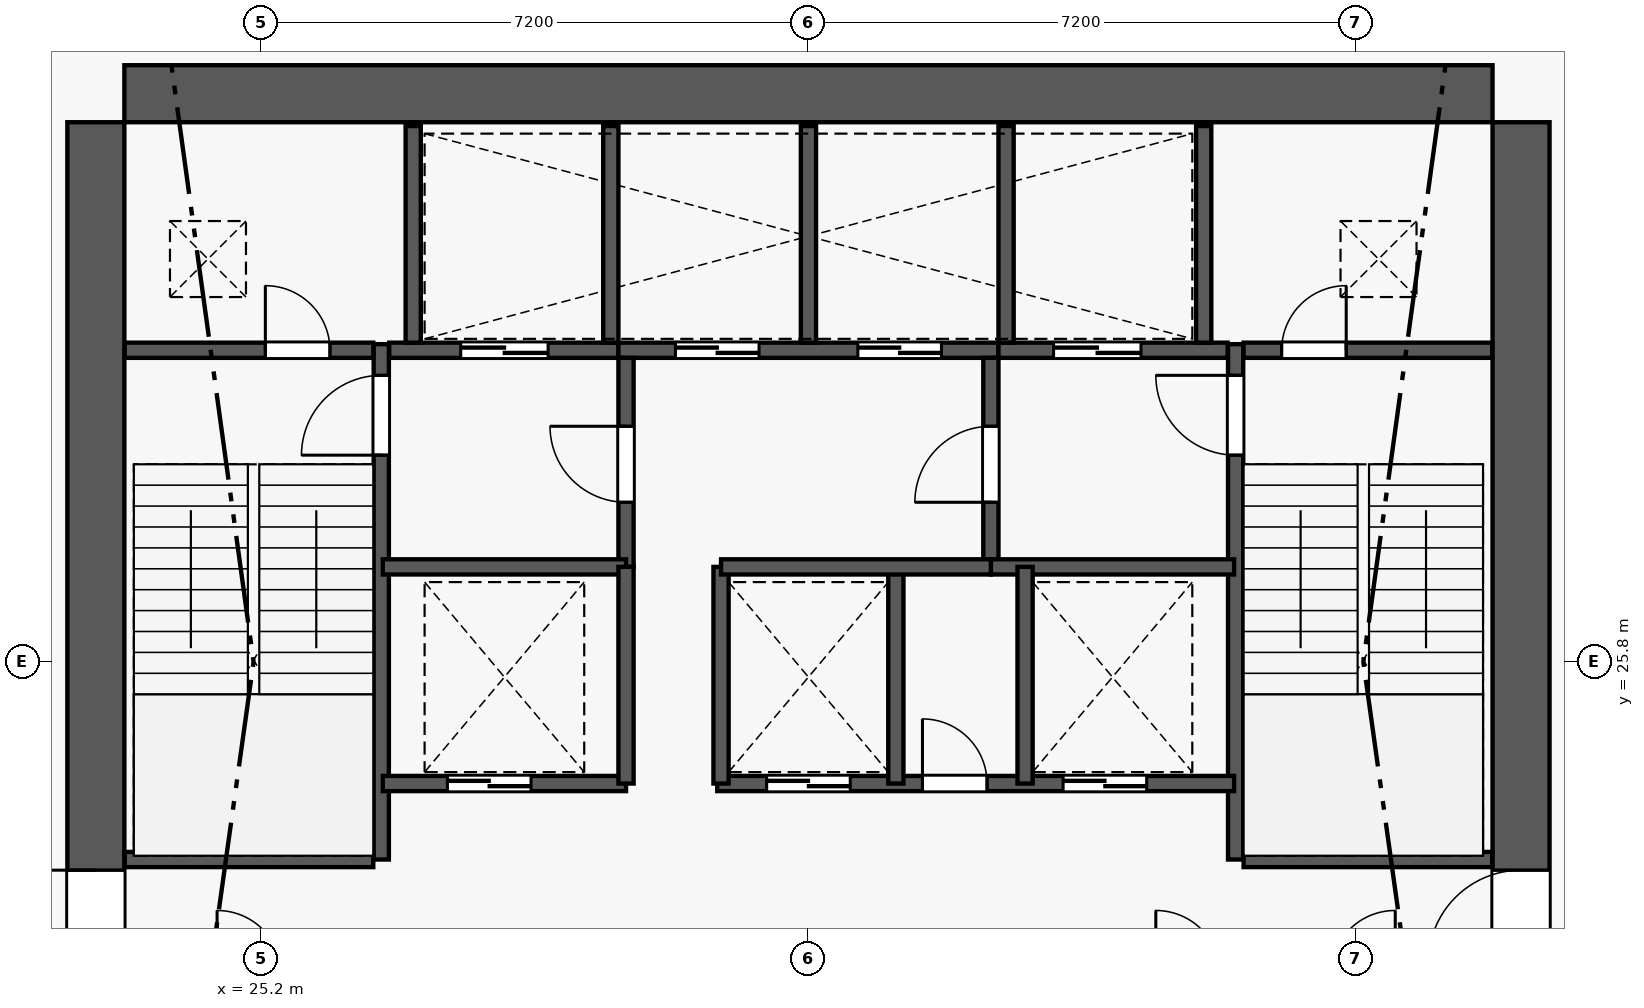
"""IFC4 building model, lengths in metres.
Left out: names, types, materials, properties, quantities, classifications, styles, units other than length and angle.
Written with IfcOpenShell. Run it as: python <this file> out.ifc"""

import sys

from ifc_helpers import new_model, si_unit, direction, frame, frame_2d, origin, origin_2d, place, context, subcontext, project, spatial, rectangle, extrude, element, fill, save


model = new_model("IFC4")
c1 = context("Model", 3, precision=1e-05, world=origin(), true_north=direction((0.0, 1.0)))
c2 = subcontext(c1, "Body", "Model", "MODEL_VIEW")
j1 = project(units=[si_unit("LENGTHUNIT", "METRE"), si_unit("PLANEANGLEUNIT", "RADIAN")], contexts=[c1])
p1 = place(None, origin())
s1 = spatial("IfcSite", under=j1, at=p1, CompositionType="ELEMENT")
p2 = place(p1, origin())
s2 = spatial("IfcBuilding", under=s1, at=p2, CompositionType="ELEMENT")
p3 = place(p2, frame((0.0, 0.0, 94.2)))
s3 = spatial("IfcBuildingStorey", under=s2, at=p3, CompositionType="ELEMENT", Elevation=94.2)
for number, where, z_axis, x_axis in (
    (1, (41.775, 33.275, 0.0), (0.0, 0.0, 1.0), (1.0, 0.0, 0.0)),
    (2, (23.025, 33.275, 0.0), (0.0, 0.0, 1.0), (1.0, 0.0, 0.0)),
):
    element("IfcColumn", number, at=place(p3, frame(where, z_axis=z_axis, x_axis=x_axis)), inside=s3, PredefinedType="COLUMN", context=c2, shape_type="SweptSolid", body=[
        extrude(rectangle(XDim=0.75, YDim=0.75, at=origin_2d()), origin(), (0.0, 0.0, 1.0), 4.2),
    ])
p4 = place(p3, frame((23.4, 33.275, 0.0), z_axis=(0.0, 0.0, 1.0), x_axis=(1.0, 0.0, 0.0)))
e3 = element("IfcWall", 3, at=p4, inside=s3, PredefinedType="SHEAR", context=c2, shape_type="SweptSolid", body=[
    extrude(rectangle(XDim=18.0, YDim=0.75, at=frame_2d((9.0, 0.0))), origin(), (0.0, 0.0, 1.0), 3.99),
])
p5 = place(p3, frame((23.025, 18.9, 0.0), z_axis=(0.0, 0.0, 1.0), x_axis=(0.0, 1.0, 0.0)))
e4 = element("IfcWall", 4, at=p5, inside=s3, PredefinedType="SHEAR", context=c2, shape_type="SweptSolid", body=[
    extrude(rectangle(XDim=14.0, YDim=0.75, at=frame_2d((7.0, 0.0))), origin(), (0.0, 0.0, 1.0), 3.99),
])
p6 = place(p5, frame((2.94, 0.0, 0.0)))
e5 = element("IfcOpeningElement", 5, at=p6, cuts=e4, PredefinedType="OPENING", context=c2, shape_type="SweptSolid", body=[
    extrude(rectangle(XDim=1.22, YDim=2.25, at=frame_2d((0.61, 1.125))), frame((0.0, 0.385, 0.0), z_axis=(0.0, -1.0, 0.0), x_axis=(1.0, 0.0, 0.0)), (0.0, 0.0, 1.0), 0.77),
])
p7 = place(p3, frame((41.775, 18.9, 0.0), z_axis=(0.0, 0.0, 1.0), x_axis=(0.0, 1.0, 0.0)))
e6 = element("IfcWall", 6, at=p7, inside=s3, PredefinedType="SHEAR", context=c2, shape_type="SweptSolid", body=[
    extrude(rectangle(XDim=14.0, YDim=0.75, at=frame_2d((7.0, 0.0))), origin(), (0.0, 0.0, 1.0), 3.99),
])
p8 = place(p7, frame((2.94, 0.0, 0.0)))
e7 = element("IfcOpeningElement", 7, at=p8, cuts=e6, PredefinedType="OPENING", context=c2, shape_type="SweptSolid", body=[
    extrude(rectangle(XDim=1.22, YDim=2.25, at=frame_2d((0.61, 1.125))), frame((0.0, 0.385, 0.0), z_axis=(0.0, -1.0, 0.0), x_axis=(1.0, 0.0, 0.0)), (0.0, 0.0, 1.0), 0.77),
])
p9 = place(p3, frame((26.78, 23.2, 0.0), z_axis=(0.0, 0.0, 1.0), x_axis=(0.0, 1.0, 0.0)))
e8 = element("IfcWall", 8, at=p9, inside=s3, PredefinedType="SHEAR", context=c2, shape_type="SweptSolid", body=[
    extrude(rectangle(XDim=6.78, YDim=0.2, at=frame_2d((3.39, 0.0))), origin(), (0.0, 0.0, 1.0), 4.2),
])
p10 = place(p9, frame((5.32, 0.0, 0.0)))
e9 = element("IfcOpeningElement", 9, at=p10, cuts=e8, PredefinedType="OPENING", context=c2, shape_type="SweptSolid", body=[
    extrude(rectangle(XDim=1.05, YDim=2.15, at=frame_2d((0.525, 1.075))), frame((0.0, 0.11, 0.0), z_axis=(0.0, -1.0, 0.0), x_axis=(1.0, 0.0, 0.0)), (0.0, 0.0, 1.0), 0.22),
])
p11 = place(p3, frame((23.405, 23.2, 0.0), z_axis=(0.0, 0.0, 1.0), x_axis=(1.0, 0.0, 0.0)))
e10 = element("IfcWall", 10, at=p11, inside=s3, PredefinedType="PLUMBINGWALL", context=c2, shape_type="SweptSolid", body=[
    extrude(rectangle(XDim=3.27, YDim=0.2, at=frame_2d((1.635, 0.0))), origin(), (0.0, 0.0, 1.0), 3.99),
])
p12 = place(p3, frame((38.02, 23.2, 0.0), z_axis=(0.0, 0.0, 1.0), x_axis=(0.0, 1.0, 0.0)))
e11 = element("IfcWall", 11, at=p12, inside=s3, PredefinedType="SHEAR", context=c2, shape_type="SweptSolid", body=[
    extrude(rectangle(XDim=6.78, YDim=0.2, at=frame_2d((3.39, 0.0))), origin(), (0.0, 0.0, 1.0), 4.2),
])
p13 = place(p12, frame((5.32, 0.0, 0.0)))
e12 = element("IfcOpeningElement", 12, at=p13, cuts=e11, PredefinedType="OPENING", context=c2, shape_type="SweptSolid", body=[
    extrude(rectangle(XDim=1.05, YDim=2.15, at=frame_2d((0.525, 1.075))), frame((0.0, 0.11, 0.0), z_axis=(0.0, -1.0, 0.0), x_axis=(1.0, 0.0, 0.0)), (0.0, 0.0, 1.0), 0.22),
])
p14 = place(p3, frame((38.125, 23.2, 0.0), z_axis=(0.0, 0.0, 1.0), x_axis=(1.0, 0.0, 0.0)))
e13 = element("IfcWall", 13, at=p14, inside=s3, PredefinedType="PLUMBINGWALL", context=c2, shape_type="SweptSolid", body=[
    extrude(rectangle(XDim=3.27, YDim=0.2, at=frame_2d((1.635, 0.0))), origin(), (0.0, 0.0, 1.0), 3.99),
])
p15 = place(p3, frame((23.405, 29.9, 0.0), z_axis=(0.0, 0.0, 1.0), x_axis=(1.0, 0.0, 0.0)))
e14 = element("IfcWall", 14, at=p15, inside=s3, PredefinedType="PLUMBINGWALL", context=c2, shape_type="SweptSolid", body=[
    extrude(rectangle(XDim=3.27, YDim=0.2, at=frame_2d((1.635, 0.0))), origin(), (0.0, 0.0, 1.0), 3.99),
])
p16 = place(p15, frame((1.85, 0.0, 0.0)))
e15 = element("IfcOpeningElement", 15, at=p16, cuts=e14, PredefinedType="OPENING", context=c2, shape_type="SweptSolid", body=[
    extrude(rectangle(XDim=0.85, YDim=2.05, at=frame_2d((0.425, 1.025))), frame((0.0, 0.11, 0.0), z_axis=(0.0, -1.0, 0.0), x_axis=(1.0, 0.0, 0.0)), (0.0, 0.0, 1.0), 0.22),
])
p17 = place(p3, frame((26.885, 29.9, 0.0), z_axis=(0.0, 0.0, 1.0), x_axis=(1.0, 0.0, 0.0)))
e16 = element("IfcWall", 16, at=p17, inside=s3, PredefinedType="PLUMBINGWALL", context=c2, shape_type="SweptSolid", body=[
    extrude(rectangle(XDim=3.015, YDim=0.2, at=frame_2d((1.507, 0.0))), origin(), (0.0, 0.0, 1.0), 3.99),
])
p18 = place(p17, frame((0.94, 0.0, 0.0)))
e17 = element("IfcOpeningElement", 17, at=p18, cuts=e16, PredefinedType="OPENING", context=c2, shape_type="SweptSolid", body=[
    extrude(rectangle(XDim=1.15, YDim=2.2, at=frame_2d((0.575, 1.1))), frame((0.0, 0.11, 0.0), z_axis=(0.0, -1.0, 0.0), x_axis=(1.0, 0.0, 0.0)), (0.0, 0.0, 1.0), 0.22),
])
p19 = place(p3, frame((29.9, 29.9, 0.0), z_axis=(0.0, 0.0, 1.0), x_axis=(1.0, 0.0, 0.0)))
e18 = element("IfcWall", 18, at=p19, inside=s3, PredefinedType="PLUMBINGWALL", context=c2, shape_type="SweptSolid", body=[
    extrude(rectangle(XDim=5.0, YDim=0.2, at=frame_2d((2.5, 0.0))), origin(), (0.0, 0.0, 1.0), 3.99),
])
p20 = place(p19, frame((0.75, 0.0, 0.0)))
e19 = element("IfcOpeningElement", 19, at=p20, cuts=e18, PredefinedType="OPENING", context=c2, shape_type="SweptSolid", body=[
    extrude(rectangle(XDim=1.1, YDim=2.2, at=frame_2d((0.55, 1.1))), frame((0.0, 0.11, 0.0), z_axis=(0.0, -1.0, 0.0), x_axis=(1.0, 0.0, 0.0)), (0.0, 0.0, 1.0), 0.22),
])
p21 = place(p19, frame((3.15, 0.0, 0.0)))
e20 = element("IfcOpeningElement", 20, at=p21, cuts=e18, PredefinedType="OPENING", context=c2, shape_type="SweptSolid", body=[
    extrude(rectangle(XDim=1.1, YDim=2.2, at=frame_2d((0.55, 1.1))), frame((0.0, 0.11, 0.0), z_axis=(0.0, -1.0, 0.0), x_axis=(1.0, 0.0, 0.0)), (0.0, 0.0, 1.0), 0.22),
])
p22 = place(p3, frame((34.9, 29.9, 0.0), z_axis=(0.0, 0.0, 1.0), x_axis=(1.0, 0.0, 0.0)))
e21 = element("IfcWall", 21, at=p22, inside=s3, PredefinedType="PLUMBINGWALL", context=c2, shape_type="SweptSolid", body=[
    extrude(rectangle(XDim=3.015, YDim=0.2, at=frame_2d((1.508, 0.0))), origin(), (0.0, 0.0, 1.0), 3.99),
])
p23 = place(p22, frame((0.725, 0.0, 0.0)))
e22 = element("IfcOpeningElement", 22, at=p23, cuts=e21, PredefinedType="OPENING", context=c2, shape_type="SweptSolid", body=[
    extrude(rectangle(XDim=1.15, YDim=2.2, at=frame_2d((0.575, 1.1))), frame((0.0, 0.11, 0.0), z_axis=(0.0, -1.0, 0.0), x_axis=(1.0, 0.0, 0.0)), (0.0, 0.0, 1.0), 0.22),
])
p24 = place(p3, frame((38.125, 29.9, 0.0), z_axis=(0.0, 0.0, 1.0), x_axis=(1.0, 0.0, 0.0)))
e23 = element("IfcWall", 23, at=p24, inside=s3, PredefinedType="PLUMBINGWALL", context=c2, shape_type="SweptSolid", body=[
    extrude(rectangle(XDim=3.27, YDim=0.2, at=frame_2d((1.635, 0.0))), origin(), (0.0, 0.0, 1.0), 3.99),
])
p25 = place(p24, frame((0.5, 0.0, 0.0)))
e24 = element("IfcOpeningElement", 24, at=p25, cuts=e23, PredefinedType="OPENING", context=c2, shape_type="SweptSolid", body=[
    extrude(rectangle(XDim=0.85, YDim=2.05, at=frame_2d((0.425, 1.025))), frame((0.0, 0.11, 0.0), z_axis=(0.0, -1.0, 0.0), x_axis=(1.0, 0.0, 0.0)), (0.0, 0.0, 1.0), 0.22),
])
for number, where, z_axis, x_axis in (
    (25, (27.2, 30.0, 0.0), (0.0, 0.0, 1.0), (0.0, 1.0, 0.0)),
    (26, (29.8, 30.0, 0.0), (0.0, 0.0, 1.0), (0.0, 1.0, 0.0)),
    (27, (32.4, 30.0, 0.0), (0.0, 0.0, 1.0), (0.0, 1.0, 0.0)),
    (28, (35.0, 30.0, 0.0), (0.0, 0.0, 1.0), (0.0, 1.0, 0.0)),
    (29, (37.6, 30.0, 0.0), (0.0, 0.0, 1.0), (0.0, 1.0, 0.0)),
):
    element("IfcWall", number, at=place(p3, frame(where, z_axis=z_axis, x_axis=x_axis)), inside=s3, PredefinedType="PLUMBINGWALL", context=c2, shape_type="SweptSolid", body=[
        extrude(rectangle(XDim=2.85, YDim=0.2, at=frame_2d((1.425, 0.0))), origin(), (0.0, 0.0, 1.0), 3.99),
    ])
p26 = place(p3, frame((30.0, 27.05, 0.0), z_axis=(0.0, 0.0, 1.0), x_axis=(0.0, 1.0, 0.0)))
e30 = element("IfcWall", 30, at=p26, inside=s3, PredefinedType="PLUMBINGWALL", context=c2, shape_type="SweptSolid", body=[
    extrude(rectangle(XDim=2.75, YDim=0.2, at=frame_2d((1.375, 0.0))), origin(), (0.0, 0.0, 1.0), 3.99),
])
p27 = place(p26, frame((0.85, 0.0, 0.0)))
e31 = element("IfcOpeningElement", 31, at=p27, cuts=e30, PredefinedType="OPENING", context=c2, shape_type="SweptSolid", body=[
    extrude(rectangle(XDim=1.0, YDim=2.15, at=frame_2d((0.5, 1.075))), frame((0.0, 0.11, 0.0), z_axis=(0.0, -1.0, 0.0), x_axis=(1.0, 0.0, 0.0)), (0.0, 0.0, 1.0), 0.22),
])
p28 = place(p3, frame((26.8, 27.05, 0.0), z_axis=(0.0, 0.0, 1.0), x_axis=(1.0, 0.0, 0.0)))
e32 = element("IfcWall", 32, at=p28, inside=s3, PredefinedType="PLUMBINGWALL", context=c2, shape_type="SweptSolid", body=[
    extrude(rectangle(XDim=3.2, YDim=0.2, at=frame_2d((1.6, 0.0))), origin(), (0.0, 0.0, 1.0), 3.99),
])
p29 = place(p3, frame((34.8, 27.05, 0.0), z_axis=(0.0, 0.0, 1.0), x_axis=(0.0, 1.0, 0.0)))
e33 = element("IfcWall", 33, at=p29, inside=s3, PredefinedType="PLUMBINGWALL", context=c2, shape_type="SweptSolid", body=[
    extrude(rectangle(XDim=2.75, YDim=0.2, at=frame_2d((1.375, 0.0))), origin(), (0.0, 0.0, 1.0), 3.99),
])
p30 = place(p29, frame((0.85, 0.0, 0.0)))
e34 = element("IfcOpeningElement", 34, at=p30, cuts=e33, PredefinedType="OPENING", context=c2, shape_type="SweptSolid", body=[
    extrude(rectangle(XDim=1.0, YDim=2.15, at=frame_2d((0.5, 1.075))), frame((0.0, 0.11, 0.0), z_axis=(0.0, -1.0, 0.0), x_axis=(1.0, 0.0, 0.0)), (0.0, 0.0, 1.0), 0.22),
])
p31 = place(p3, frame((34.8, 27.05, 0.0), z_axis=(0.0, 0.0, 1.0), x_axis=(1.0, 0.0, 0.0)))
e35 = element("IfcWall", 35, at=p31, inside=s3, PredefinedType="PLUMBINGWALL", context=c2, shape_type="SweptSolid", body=[
    extrude(rectangle(XDim=3.2, YDim=0.2, at=frame_2d((1.6, 0.0))), origin(), (0.0, 0.0, 1.0), 3.99),
])
p32 = place(p3, frame((26.8, 24.2, 0.0), z_axis=(0.0, 0.0, 1.0), x_axis=(1.0, 0.0, 0.0)))
e36 = element("IfcWall", 36, at=p32, inside=s3, PredefinedType="PLUMBINGWALL", context=c2, shape_type="SweptSolid", body=[
    extrude(rectangle(XDim=3.2, YDim=0.2, at=frame_2d((1.6, 0.0))), origin(), (0.0, 0.0, 1.0), 3.99),
])
p33 = place(p32, frame((0.85, 0.0, 0.0)))
e37 = element("IfcOpeningElement", 37, at=p33, cuts=e36, PredefinedType="OPENING", context=c2, shape_type="SweptSolid", body=[
    extrude(rectangle(XDim=1.1, YDim=2.2, at=frame_2d((0.55, 1.1))), frame((0.0, 0.11, 0.0), z_axis=(0.0, -1.0, 0.0), x_axis=(1.0, 0.0, 0.0)), (0.0, 0.0, 1.0), 0.22),
])
p34 = place(p3, frame((30.0, 24.2, 0.0), z_axis=(0.0, 0.0, 1.0), x_axis=(0.0, 1.0, 0.0)))
e38 = element("IfcWall", 38, at=p34, inside=s3, PredefinedType="PLUMBINGWALL", context=c2, shape_type="SweptSolid", body=[
    extrude(rectangle(XDim=2.85, YDim=0.2, at=frame_2d((1.425, 0.0))), origin(), (0.0, 0.0, 1.0), 3.99),
])
p35 = place(p3, frame((31.2, 24.2, 0.0), z_axis=(0.0, 0.0, 1.0), x_axis=(1.0, 0.0, 0.0)))
e39 = element("IfcWall", 39, at=p35, inside=s3, PredefinedType="PLUMBINGWALL", context=c2, shape_type="SweptSolid", body=[
    extrude(rectangle(XDim=6.8, YDim=0.2, at=frame_2d((3.4, 0.0))), origin(), (0.0, 0.0, 1.0), 3.99),
])
p36 = place(p35, frame((0.65, 0.0, 0.0)))
e40 = element("IfcOpeningElement", 40, at=p36, cuts=e39, PredefinedType="OPENING", context=c2, shape_type="SweptSolid", body=[
    extrude(rectangle(XDim=1.1, YDim=2.2, at=frame_2d((0.55, 1.1))), frame((0.0, 0.11, 0.0), z_axis=(0.0, -1.0, 0.0), x_axis=(1.0, 0.0, 0.0)), (0.0, 0.0, 1.0), 0.22),
])
p37 = place(p35, frame((2.7, 0.0, 0.0)))
e41 = element("IfcOpeningElement", 41, at=p37, cuts=e39, PredefinedType="OPENING", context=c2, shape_type="SweptSolid", body=[
    extrude(rectangle(XDim=0.85, YDim=2.05, at=frame_2d((0.425, 1.025))), frame((0.0, 0.11, 0.0), z_axis=(0.0, -1.0, 0.0), x_axis=(1.0, 0.0, 0.0)), (0.0, 0.0, 1.0), 0.22),
])
p38 = place(p35, frame((4.55, 0.0, 0.0)))
e42 = element("IfcOpeningElement", 42, at=p38, cuts=e39, PredefinedType="OPENING", context=c2, shape_type="SweptSolid", body=[
    extrude(rectangle(XDim=1.1, YDim=2.2, at=frame_2d((0.55, 1.1))), frame((0.0, 0.11, 0.0), z_axis=(0.0, -1.0, 0.0), x_axis=(1.0, 0.0, 0.0)), (0.0, 0.0, 1.0), 0.22),
])
for number, where, z_axis, x_axis in (
    (43, (31.25, 24.2, 0.0), (0.0, 0.0, 1.0), (0.0, 1.0, 0.0)),
    (44, (33.55, 24.2, 0.0), (0.0, 0.0, 1.0), (0.0, 1.0, 0.0)),
    (45, (35.25, 24.2, 0.0), (0.0, 0.0, 1.0), (0.0, 1.0, 0.0)),
):
    element("IfcWall", number, at=place(p3, frame(where, z_axis=z_axis, x_axis=x_axis)), inside=s3, PredefinedType="PLUMBINGWALL", context=c2, shape_type="SweptSolid", body=[
        extrude(rectangle(XDim=2.85, YDim=0.2, at=frame_2d((1.425, 0.0))), origin(), (0.0, 0.0, 1.0), 3.99),
    ])
p39 = place(p3, frame((31.25, 27.05, 0.0), z_axis=(0.0, 0.0, 1.0), x_axis=(1.0, 0.0, 0.0)))
e46 = element("IfcWall", 46, at=p39, inside=s3, PredefinedType="PLUMBINGWALL", context=c2, shape_type="SweptSolid", body=[
    extrude(rectangle(XDim=3.55, YDim=0.2, at=frame_2d((1.775, 0.0))), origin(), (0.0, 0.0, 1.0), 3.99),
])
p40 = place(p6, origin())
e47 = element("IfcDoor", 47, at=p40, inside=s3, OperationType="SINGLE_SWING_RIGHT", PredefinedType="DOOR", context=c2, shape_type="SweptSolid", body=[
    extrude(rectangle(XDim=1.22, YDim=2.25, at=frame_2d((0.61, 1.125))), frame((0.0, 0.025, 0.0), z_axis=(0.0, -1.0, 0.0), x_axis=(1.0, 0.0, 0.0)), (0.0, 0.0, 1.0), 0.05),
])
fill(e5, e47)
p41 = place(p8, origin())
e48 = element("IfcDoor", 48, at=p41, inside=s3, OperationType="SINGLE_SWING_LEFT", PredefinedType="DOOR", context=c2, shape_type="SweptSolid", body=[
    extrude(rectangle(XDim=1.22, YDim=2.25, at=frame_2d((0.61, 1.125))), frame((0.0, 0.025, 0.0), z_axis=(0.0, -1.0, 0.0), x_axis=(1.0, 0.0, 0.0)), (0.0, 0.0, 1.0), 0.05),
])
fill(e7, e48)
p42 = place(p10, origin())
e49 = element("IfcDoor", 49, at=p42, inside=s3, OperationType="SINGLE_SWING_LEFT", PredefinedType="DOOR", context=c2, shape_type="SweptSolid", body=[
    extrude(rectangle(XDim=1.05, YDim=2.15, at=frame_2d((0.525, 1.075))), frame((0.0, 0.025, 0.0), z_axis=(0.0, -1.0, 0.0), x_axis=(1.0, 0.0, 0.0)), (0.0, 0.0, 1.0), 0.05),
])
fill(e9, e49)
p43 = place(p13, origin())
e50 = element("IfcDoor", 50, at=p43, inside=s3, OperationType="SINGLE_SWING_RIGHT", PredefinedType="DOOR", context=c2, shape_type="SweptSolid", body=[
    extrude(rectangle(XDim=1.05, YDim=2.15, at=frame_2d((0.525, 1.075))), frame((0.0, 0.025, 0.0), z_axis=(0.0, -1.0, 0.0), x_axis=(1.0, 0.0, 0.0)), (0.0, 0.0, 1.0), 0.05),
])
fill(e12, e50)
p44 = place(p16, origin())
e51 = element("IfcDoor", 51, at=p44, inside=s3, OperationType="SINGLE_SWING_LEFT", PredefinedType="DOOR", context=c2, shape_type="SweptSolid", body=[
    extrude(rectangle(XDim=0.85, YDim=2.05, at=frame_2d((0.425, 1.025))), frame((0.0, 0.025, 0.0), z_axis=(0.0, -1.0, 0.0), x_axis=(1.0, 0.0, 0.0)), (0.0, 0.0, 1.0), 0.05),
])
fill(e15, e51)
p45 = place(p25, origin())
e52 = element("IfcDoor", 52, at=p45, inside=s3, OperationType="SINGLE_SWING_RIGHT", PredefinedType="DOOR", context=c2, shape_type="SweptSolid", body=[
    extrude(rectangle(XDim=0.85, YDim=2.05, at=frame_2d((0.425, 1.025))), frame((0.0, 0.025, 0.0), z_axis=(0.0, -1.0, 0.0), x_axis=(1.0, 0.0, 0.0)), (0.0, 0.0, 1.0), 0.05),
])
fill(e24, e52)
p46 = place(p18, origin())
e53 = element("IfcDoor", 53, at=p46, inside=s3, OperationType="DOUBLE_DOOR_SLIDING", PredefinedType="DOOR", context=c2, shape_type="SweptSolid", body=[
    extrude(rectangle(XDim=1.15, YDim=2.2, at=frame_2d((0.575, 1.1))), frame((0.0, 0.025, 0.0), z_axis=(0.0, -1.0, 0.0), x_axis=(1.0, 0.0, 0.0)), (0.0, 0.0, 1.0), 0.05),
])
fill(e17, e53)
p47 = place(p23, origin())
e54 = element("IfcDoor", 54, at=p47, inside=s3, OperationType="DOUBLE_DOOR_SLIDING", PredefinedType="DOOR", context=c2, shape_type="SweptSolid", body=[
    extrude(rectangle(XDim=1.15, YDim=2.2, at=frame_2d((0.575, 1.1))), frame((0.0, 0.025, 0.0), z_axis=(0.0, -1.0, 0.0), x_axis=(1.0, 0.0, 0.0)), (0.0, 0.0, 1.0), 0.05),
])
fill(e22, e54)
p48 = place(p20, origin())
e55 = element("IfcDoor", 55, at=p48, inside=s3, OperationType="DOUBLE_DOOR_SLIDING", PredefinedType="DOOR", context=c2, shape_type="SweptSolid", body=[
    extrude(rectangle(XDim=1.1, YDim=2.2, at=frame_2d((0.55, 1.1))), frame((0.0, 0.025, 0.0), z_axis=(0.0, -1.0, 0.0), x_axis=(1.0, 0.0, 0.0)), (0.0, 0.0, 1.0), 0.05),
])
fill(e19, e55)
p49 = place(p21, origin())
e56 = element("IfcDoor", 56, at=p49, inside=s3, OperationType="DOUBLE_DOOR_SLIDING", PredefinedType="DOOR", context=c2, shape_type="SweptSolid", body=[
    extrude(rectangle(XDim=1.1, YDim=2.2, at=frame_2d((0.55, 1.1))), frame((0.0, 0.025, 0.0), z_axis=(0.0, -1.0, 0.0), x_axis=(1.0, 0.0, 0.0)), (0.0, 0.0, 1.0), 0.05),
])
fill(e20, e56)
p50 = place(p27, origin())
e57 = element("IfcDoor", 57, at=p50, inside=s3, OperationType="SINGLE_SWING_RIGHT", PredefinedType="DOOR", context=c2, shape_type="SweptSolid", body=[
    extrude(rectangle(XDim=1.0, YDim=2.15, at=frame_2d((0.5, 1.075))), frame((0.0, 0.025, 0.0), z_axis=(0.0, -1.0, 0.0), x_axis=(1.0, 0.0, 0.0)), (0.0, 0.0, 1.0), 0.05),
])
fill(e31, e57)
p51 = place(p30, origin())
e58 = element("IfcDoor", 58, at=p51, inside=s3, OperationType="SINGLE_SWING_LEFT", PredefinedType="DOOR", context=c2, shape_type="SweptSolid", body=[
    extrude(rectangle(XDim=1.0, YDim=2.15, at=frame_2d((0.5, 1.075))), frame((0.0, 0.025, 0.0), z_axis=(0.0, -1.0, 0.0), x_axis=(1.0, 0.0, 0.0)), (0.0, 0.0, 1.0), 0.05),
])
fill(e34, e58)
p52 = place(p33, origin())
e59 = element("IfcDoor", 59, at=p52, inside=s3, OperationType="DOUBLE_DOOR_SLIDING", PredefinedType="DOOR", context=c2, shape_type="SweptSolid", body=[
    extrude(rectangle(XDim=1.1, YDim=2.2, at=frame_2d((0.55, 1.1))), frame((0.0, 0.025, 0.0), z_axis=(0.0, -1.0, 0.0), x_axis=(1.0, 0.0, 0.0)), (0.0, 0.0, 1.0), 0.05),
])
fill(e37, e59)
p53 = place(p36, origin())
e60 = element("IfcDoor", 60, at=p53, inside=s3, OperationType="DOUBLE_DOOR_SLIDING", PredefinedType="DOOR", context=c2, shape_type="SweptSolid", body=[
    extrude(rectangle(XDim=1.1, YDim=2.2, at=frame_2d((0.55, 1.1))), frame((0.0, 0.025, 0.0), z_axis=(0.0, -1.0, 0.0), x_axis=(1.0, 0.0, 0.0)), (0.0, 0.0, 1.0), 0.05),
])
fill(e40, e60)
p54 = place(p37, origin())
e61 = element("IfcDoor", 61, at=p54, inside=s3, OperationType="SINGLE_SWING_LEFT", PredefinedType="DOOR", context=c2, shape_type="SweptSolid", body=[
    extrude(rectangle(XDim=0.85, YDim=2.05, at=frame_2d((0.425, 1.025))), frame((0.0, 0.025, 0.0), z_axis=(0.0, -1.0, 0.0), x_axis=(1.0, 0.0, 0.0)), (0.0, 0.0, 1.0), 0.05),
])
fill(e41, e61)
p55 = place(p38, origin())
e62 = element("IfcDoor", 62, at=p55, inside=s3, OperationType="DOUBLE_DOOR_SLIDING", PredefinedType="DOOR", context=c2, shape_type="SweptSolid", body=[
    extrude(rectangle(XDim=1.1, YDim=2.2, at=frame_2d((0.55, 1.1))), frame((0.0, 0.025, 0.0), z_axis=(0.0, -1.0, 0.0), x_axis=(1.0, 0.0, 0.0)), (0.0, 0.0, 1.0), 0.05),
])
fill(e42, e62)
save(model, sys.argv[1])
